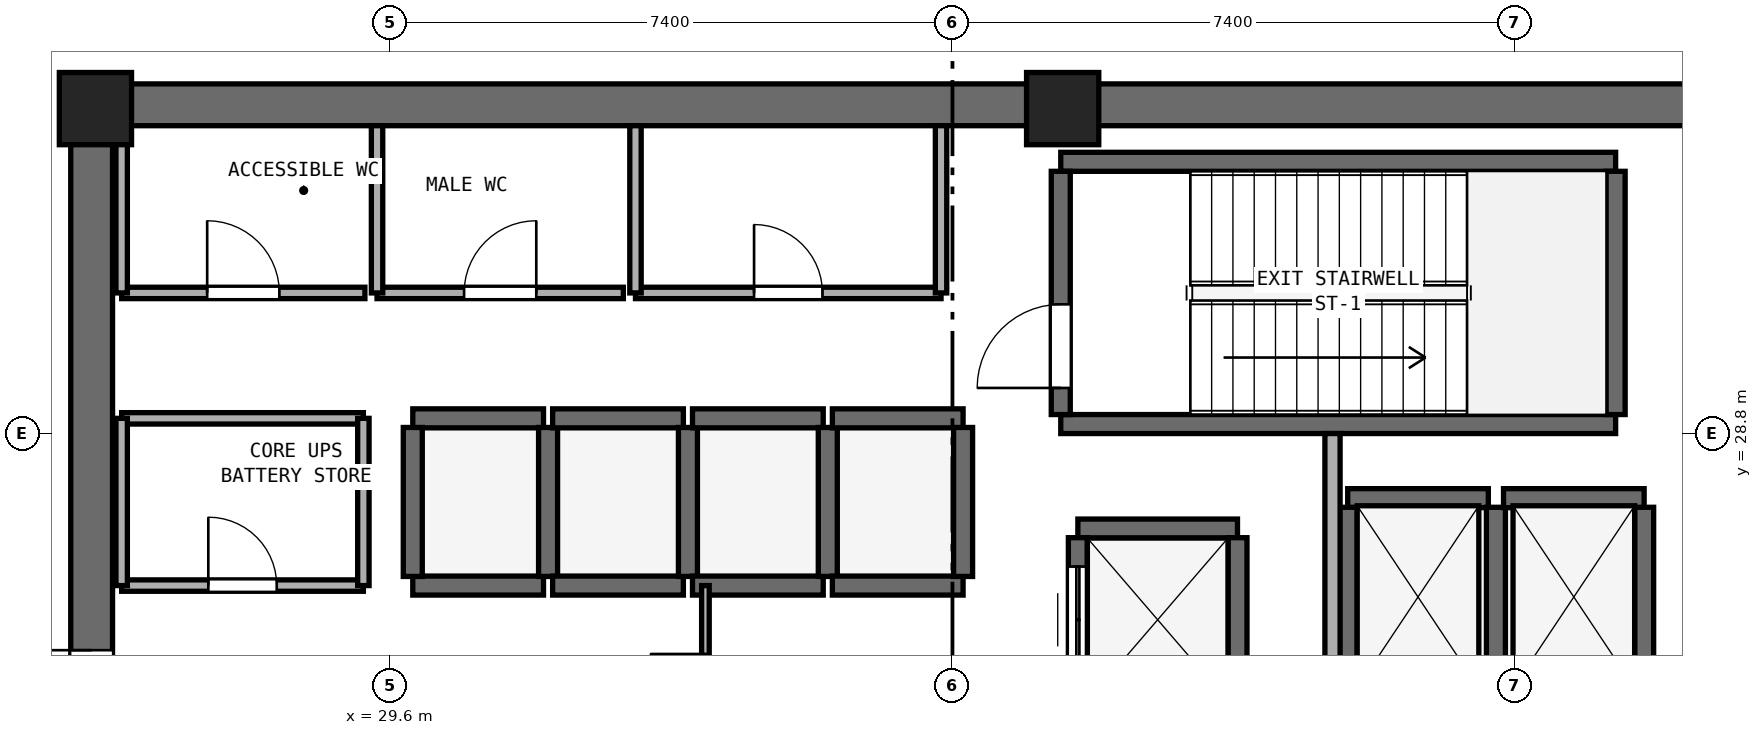
"""IFC4 building model, lengths in metres.
Left out: names, types, materials, properties, quantities, classifications, styles, units other than length and angle.
Written with IfcOpenShell. Run it as: python <this file> out.ifc"""

import sys

from ifc_helpers import new_model, si_unit, direction, frame, frame_2d, origin, origin_2d, place, context, subcontext, project, spatial, rectangle, extrude, element, fill, save


model = new_model("IFC4")
c1 = context("Model", 3, precision=1e-05, world=origin(), true_north=direction((0.0, 1.0)))
c2 = subcontext(c1, "Body", "Model", "MODEL_VIEW")
j1 = project(units=[si_unit("LENGTHUNIT", "METRE"), si_unit("PLANEANGLEUNIT", "RADIAN")], contexts=[c1])
p1 = place(None, origin())
s1 = spatial("IfcSite", under=j1, at=p1, CompositionType="ELEMENT")
p2 = place(p1, origin())
s2 = spatial("IfcBuilding", under=s1, at=p2, CompositionType="ELEMENT")
p3 = place(p2, frame((0.0, 0.0, 220.0)))
s3 = spatial("IfcBuildingStorey", under=s2, at=p3, CompositionType="ELEMENT", Elevation=220.0)
p4 = place(p3, frame((25.4, 33.125, 0.0), z_axis=(0.0, 0.0, 1.0), x_axis=(1.0, 0.0, 0.0)))
e1 = element("IfcWall", 1, at=p4, inside=s3, PredefinedType="SHEAR", context=c2, shape_type="SweptSolid", body=[
    extrude(rectangle(XDim=23.2, YDim=0.55, at=frame_2d((11.6, 0.0))), origin(), (0.0, 0.0, 1.0), 4.71),
])
p5 = place(p3, frame((25.675, 17.55, 0.0), z_axis=(0.0, 0.0, 1.0), x_axis=(0.0, 1.0, 0.0)))
e2 = element("IfcWall", 2, at=p5, inside=s3, PredefinedType="SHEAR", context=c2, shape_type="SweptSolid", body=[
    extrude(rectangle(XDim=15.3, YDim=0.55, at=frame_2d((7.65, 0.0))), origin(), (0.0, 0.0, 1.0), 4.71),
])
p6 = place(p5, frame((6.9, 0.0, 0.0)))
e3 = element("IfcOpeningElement", 3, at=p6, cuts=e2, PredefinedType="OPENING", context=c2, shape_type="SweptSolid", body=[
    extrude(rectangle(XDim=1.5, YDim=2.15, at=frame_2d((0.75, 1.075))), frame((0.0, 0.285, 0.0), z_axis=(0.0, -1.0, 0.0), x_axis=(1.0, 0.0, 0.0)), (0.0, 0.0, 1.0), 0.57),
])
for number, where, z_axis, x_axis in (
    (4, (38.45, 33.075, 0.0), (0.0, 0.0, 1.0), (1.0, 0.0, 0.0)),
    (5, (25.725, 33.075, 0.0), (0.0, 0.0, 1.0), (1.0, 0.0, 0.0)),
):
    element("IfcColumn", number, at=place(p3, frame(where, z_axis=z_axis, x_axis=x_axis)), inside=s3, PredefinedType="PILASTER", context=c2, shape_type="SweptSolid", body=[
        extrude(rectangle(XDim=0.95, YDim=0.95, at=origin_2d()), origin(), (0.0, 0.0, 1.0), 5.0),
    ])
for number, where, z_axis, x_axis in (
    (6, (38.425, 28.925, 0.0), (0.0, 0.0, 1.0), (1.0, 0.0, 0.0)),
    (7, (38.425, 32.375, 0.0), (0.0, 0.0, 1.0), (1.0, 0.0, 0.0)),
):
    element("IfcWall", number, at=place(p3, frame(where, z_axis=z_axis, x_axis=x_axis)), inside=s3, PredefinedType="SHEAR", context=c2, shape_type="SweptSolid", body=[
        extrude(rectangle(XDim=7.3, YDim=0.25, at=frame_2d((3.65, 0.0))), origin(), (0.0, 0.0, 1.0), 4.71),
    ])
p7 = place(p3, frame((38.425, 29.05, 0.0), z_axis=(0.0, 0.0, 1.0), x_axis=(0.0, 1.0, 0.0)))
e8 = element("IfcWall", 8, at=p7, inside=s3, PredefinedType="SHEAR", context=c2, shape_type="SweptSolid", body=[
    extrude(rectangle(XDim=3.2, YDim=0.25, at=frame_2d((1.6, 0.0))), origin(), (0.0, 0.0, 1.0), 4.71),
])
p8 = place(p7, frame((0.35, 0.0, 0.0)))
e9 = element("IfcOpeningElement", 9, at=p8, cuts=e8, PredefinedType="OPENING", context=c2, shape_type="SweptSolid", body=[
    extrude(rectangle(XDim=1.1, YDim=2.15, at=frame_2d((0.55, 1.075))), frame((0.0, 0.135, 0.0), z_axis=(0.0, -1.0, 0.0), x_axis=(1.0, 0.0, 0.0)), (0.0, 0.0, 1.0), 0.27),
])
p9 = place(p3, frame((45.725, 29.05, 0.0), z_axis=(0.0, 0.0, 1.0), x_axis=(0.0, 1.0, 0.0)))
e10 = element("IfcWall", 10, at=p9, inside=s3, PredefinedType="SHEAR", context=c2, shape_type="SweptSolid", body=[
    extrude(rectangle(XDim=3.2, YDim=0.25, at=frame_2d((1.6, 0.0))), origin(), (0.0, 0.0, 1.0), 4.71),
])
for number, where, z_axis, x_axis in (
    (11, (29.9, 26.8, 0.0), (0.0, 0.0, 1.0), (1.0, 0.0, 0.0)),
    (12, (29.9, 29.0, 0.0), (0.0, 0.0, 1.0), (1.0, 0.0, 0.0)),
):
    element("IfcWall", number, at=place(p3, frame(where, z_axis=z_axis, x_axis=x_axis)), inside=s3, PredefinedType="SHEAR", context=c2, shape_type="SweptSolid", body=[
        extrude(rectangle(XDim=1.72, YDim=0.25, at=frame_2d((0.86, 0.0))), origin(), (0.0, 0.0, 1.0), 4.71),
    ])
for number, where, z_axis, x_axis in (
    (13, (29.9, 26.92, 0.0), (0.0, 0.0, 1.0), (0.0, 1.0, 0.0)),
    (14, (31.68, 26.92, 0.0), (0.0, 0.0, 1.0), (0.0, 1.0, 0.0)),
):
    element("IfcWall", number, at=place(p3, frame(where, z_axis=z_axis, x_axis=x_axis)), inside=s3, PredefinedType="SHEAR", context=c2, shape_type="SweptSolid", body=[
        extrude(rectangle(XDim=1.96, YDim=0.25, at=frame_2d((0.98, 0.0))), origin(), (0.0, 0.0, 1.0), 4.71),
    ])
for number, where, z_axis, x_axis in (
    (15, (31.74, 26.8, 0.0), (0.0, 0.0, 1.0), (1.0, 0.0, 0.0)),
    (16, (31.74, 29.0, 0.0), (0.0, 0.0, 1.0), (1.0, 0.0, 0.0)),
):
    element("IfcWall", number, at=place(p3, frame(where, z_axis=z_axis, x_axis=x_axis)), inside=s3, PredefinedType="SHEAR", context=c2, shape_type="SweptSolid", body=[
        extrude(rectangle(XDim=1.72, YDim=0.25, at=frame_2d((0.86, 0.0))), origin(), (0.0, 0.0, 1.0), 4.71),
    ])
p10 = place(p3, frame((33.52, 26.92, 0.0), z_axis=(0.0, 0.0, 1.0), x_axis=(0.0, 1.0, 0.0)))
e17 = element("IfcWall", 17, at=p10, inside=s3, PredefinedType="SHEAR", context=c2, shape_type="SweptSolid", body=[
    extrude(rectangle(XDim=1.96, YDim=0.25, at=frame_2d((0.98, 0.0))), origin(), (0.0, 0.0, 1.0), 4.71),
])
for number, where, z_axis, x_axis in (
    (18, (33.58, 26.8, 0.0), (0.0, 0.0, 1.0), (1.0, 0.0, 0.0)),
    (19, (33.58, 29.0, 0.0), (0.0, 0.0, 1.0), (1.0, 0.0, 0.0)),
):
    element("IfcWall", number, at=place(p3, frame(where, z_axis=z_axis, x_axis=x_axis)), inside=s3, PredefinedType="SHEAR", context=c2, shape_type="SweptSolid", body=[
        extrude(rectangle(XDim=1.72, YDim=0.25, at=frame_2d((0.86, 0.0))), origin(), (0.0, 0.0, 1.0), 4.71),
    ])
p11 = place(p3, frame((35.36, 26.92, 0.0), z_axis=(0.0, 0.0, 1.0), x_axis=(0.0, 1.0, 0.0)))
e20 = element("IfcWall", 20, at=p11, inside=s3, PredefinedType="SHEAR", context=c2, shape_type="SweptSolid", body=[
    extrude(rectangle(XDim=1.96, YDim=0.25, at=frame_2d((0.98, 0.0))), origin(), (0.0, 0.0, 1.0), 4.71),
])
for number, where, z_axis, x_axis in (
    (21, (35.42, 26.8, 0.0), (0.0, 0.0, 1.0), (1.0, 0.0, 0.0)),
    (22, (35.42, 29.0, 0.0), (0.0, 0.0, 1.0), (1.0, 0.0, 0.0)),
):
    element("IfcWall", number, at=place(p3, frame(where, z_axis=z_axis, x_axis=x_axis)), inside=s3, PredefinedType="SHEAR", context=c2, shape_type="SweptSolid", body=[
        extrude(rectangle(XDim=1.72, YDim=0.25, at=frame_2d((0.86, 0.0))), origin(), (0.0, 0.0, 1.0), 4.71),
    ])
p12 = place(p3, frame((37.14, 26.92, 0.0), z_axis=(0.0, 0.0, 1.0), x_axis=(0.0, 1.0, 0.0)))
e23 = element("IfcWall", 23, at=p12, inside=s3, PredefinedType="SHEAR", context=c2, shape_type="SweptSolid", body=[
    extrude(rectangle(XDim=1.96, YDim=0.25, at=frame_2d((0.98, 0.0))), origin(), (0.0, 0.0, 1.0), 4.71),
])
p13 = place(p3, frame((42.2, 27.95, 0.0), z_axis=(0.0, 0.0, 1.0), x_axis=(1.0, 0.0, 0.0)))
e24 = element("IfcWall", 24, at=p13, inside=s3, PredefinedType="SHEAR", context=c2, shape_type="SweptSolid", body=[
    extrude(rectangle(XDim=1.85, YDim=0.25, at=frame_2d((0.925, 0.0))), origin(), (0.0, 0.0, 1.0), 4.71),
])
for number, where, z_axis, x_axis in (
    (25, (42.2, 25.47, 0.0), (0.0, 0.0, 1.0), (0.0, 1.0, 0.0)),
    (26, (44.15, 25.47, 0.0), (0.0, 0.0, 1.0), (0.0, 1.0, 0.0)),
):
    element("IfcWall", number, at=place(p3, frame(where, z_axis=z_axis, x_axis=x_axis)), inside=s3, PredefinedType="SHEAR", context=c2, shape_type="SweptSolid", body=[
        extrude(rectangle(XDim=2.36, YDim=0.25, at=frame_2d((1.18, 0.0))), origin(), (0.0, 0.0, 1.0), 4.71),
    ])
p14 = place(p3, frame((44.25, 27.95, 0.0), z_axis=(0.0, 0.0, 1.0), x_axis=(1.0, 0.0, 0.0)))
e27 = element("IfcWall", 27, at=p14, inside=s3, PredefinedType="SHEAR", context=c2, shape_type="SweptSolid", body=[
    extrude(rectangle(XDim=1.85, YDim=0.25, at=frame_2d((0.925, 0.0))), origin(), (0.0, 0.0, 1.0), 4.71),
])
p15 = place(p3, frame((46.1, 25.47, 0.0), z_axis=(0.0, 0.0, 1.0), x_axis=(0.0, 1.0, 0.0)))
e28 = element("IfcWall", 28, at=p15, inside=s3, PredefinedType="SHEAR", context=c2, shape_type="SweptSolid", body=[
    extrude(rectangle(XDim=2.36, YDim=0.25, at=frame_2d((1.18, 0.0))), origin(), (0.0, 0.0, 1.0), 4.71),
])
p16 = place(p3, frame((38.65, 27.55, 0.0), z_axis=(0.0, 0.0, 1.0), x_axis=(1.0, 0.0, 0.0)))
e29 = element("IfcWall", 29, at=p16, inside=s3, PredefinedType="SHEAR", context=c2, shape_type="SweptSolid", body=[
    extrude(rectangle(XDim=2.1, YDim=0.25, at=frame_2d((1.05, 0.0))), origin(), (0.0, 0.0, 1.0), 4.71),
])
p17 = place(p3, frame((38.65, 25.27, 0.0), z_axis=(0.0, 0.0, 1.0), x_axis=(0.0, 1.0, 0.0)))
e30 = element("IfcWall", 30, at=p17, inside=s3, PredefinedType="SHEAR", context=c2, shape_type="SweptSolid", body=[
    extrude(rectangle(XDim=2.16, YDim=0.25, at=frame_2d((1.08, 0.0))), origin(), (0.0, 0.0, 1.0), 4.71),
])
p18 = place(p17, frame((0.38, 0.0, 0.0)))
e31 = element("IfcOpeningElement", 31, at=p18, cuts=e30, PredefinedType="OPENING", context=c2, shape_type="SweptSolid", body=[
    extrude(rectangle(XDim=1.4, YDim=2.2, at=frame_2d((0.7, 1.1))), frame((0.0, 0.135, 0.0), z_axis=(0.0, -1.0, 0.0), x_axis=(1.0, 0.0, 0.0)), (0.0, 0.0, 1.0), 0.27),
])
p19 = place(p3, frame((40.75, 25.27, 0.0), z_axis=(0.0, 0.0, 1.0), x_axis=(0.0, 1.0, 0.0)))
e32 = element("IfcWall", 32, at=p19, inside=s3, PredefinedType="SHEAR", context=c2, shape_type="SweptSolid", body=[
    extrude(rectangle(XDim=2.16, YDim=0.25, at=frame_2d((1.08, 0.0))), origin(), (0.0, 0.0, 1.0), 4.71),
])
p20 = place(p3, frame((42.0, 22.75, 0.0), z_axis=(0.0, 0.0, 1.0), x_axis=(0.0, 1.0, 0.0)))
e33 = element("IfcWall", 33, at=p20, inside=s3, PredefinedType="SOLIDWALL", context=c2, shape_type="SweptSolid", body=[
    extrude(rectangle(XDim=6.05, YDim=0.2, at=frame_2d((3.025, 0.0))), origin(), (0.0, 0.0, 1.0), 4.71),
])
p21 = place(p20, frame((0.65, 0.0, 0.0)))
e34 = element("IfcOpeningElement", 34, at=p21, cuts=e33, PredefinedType="OPENING", context=c2, shape_type="SweptSolid", body=[
    extrude(rectangle(XDim=1.2, YDim=2.15, at=frame_2d((0.6, 1.075))), frame((0.0, 0.11, 0.0), z_axis=(0.0, -1.0, 0.0), x_axis=(1.0, 0.0, 0.0)), (0.0, 0.0, 1.0), 0.22),
])
p22 = place(p3, frame((26.07, 30.65, 0.0), z_axis=(0.0, 0.0, 1.0), x_axis=(1.0, 0.0, 0.0)))
e35 = element("IfcWall", 35, at=p22, inside=s3, PredefinedType="PARTITIONING", context=c2, shape_type="SweptSolid", body=[
    extrude(rectangle(XDim=3.2, YDim=0.15, at=frame_2d((1.6, 0.0))), origin(), (0.0, 0.0, 1.0), 4.71),
])
p23 = place(p22, frame((1.125, 0.0, 0.0)))
e36 = element("IfcOpeningElement", 36, at=p23, cuts=e35, PredefinedType="OPENING", context=c2, shape_type="SweptSolid", body=[
    extrude(rectangle(XDim=0.95, YDim=2.1, at=frame_2d((0.475, 1.05))), frame((0.0, 0.085, 0.0), z_axis=(0.0, -1.0, 0.0), x_axis=(1.0, 0.0, 0.0)), (0.0, 0.0, 1.0), 0.17),
])
p24 = place(p3, frame((26.07, 30.65, 0.0), z_axis=(0.0, 0.0, 1.0), x_axis=(0.0, 1.0, 0.0)))
e37 = element("IfcWall", 37, at=p24, inside=s3, PredefinedType="PARTITIONING", context=c2, shape_type="SweptSolid", body=[
    extrude(rectangle(XDim=2.2, YDim=0.15, at=frame_2d((1.1, 0.0))), origin(), (0.0, 0.0, 1.0), 3.81),
])
p25 = place(p3, frame((29.43, 30.65, 0.0), z_axis=(0.0, 0.0, 1.0), x_axis=(1.0, 0.0, 0.0)))
e38 = element("IfcWall", 38, at=p25, inside=s3, PredefinedType="PARTITIONING", context=c2, shape_type="SweptSolid", body=[
    extrude(rectangle(XDim=3.24, YDim=0.15, at=frame_2d((1.62, 0.0))), origin(), (0.0, 0.0, 1.0), 4.71),
])
p26 = place(p25, frame((1.145, 0.0, 0.0)))
e39 = element("IfcOpeningElement", 39, at=p26, cuts=e38, PredefinedType="OPENING", context=c2, shape_type="SweptSolid", body=[
    extrude(rectangle(XDim=0.95, YDim=2.1, at=frame_2d((0.475, 1.05))), frame((0.0, 0.085, 0.0), z_axis=(0.0, -1.0, 0.0), x_axis=(1.0, 0.0, 0.0)), (0.0, 0.0, 1.0), 0.17),
])
p27 = place(p3, frame((29.43, 30.65, 0.0), z_axis=(0.0, 0.0, 1.0), x_axis=(0.0, 1.0, 0.0)))
e40 = element("IfcWall", 40, at=p27, inside=s3, PredefinedType="PARTITIONING", context=c2, shape_type="SweptSolid", body=[
    extrude(rectangle(XDim=2.2, YDim=0.15, at=frame_2d((1.1, 0.0))), origin(), (0.0, 0.0, 1.0), 4.71),
])
p28 = place(p3, frame((32.83, 30.65, 0.0), z_axis=(0.0, 0.0, 1.0), x_axis=(1.0, 0.0, 0.0)))
e41 = element("IfcWall", 41, at=p28, inside=s3, PredefinedType="PARTITIONING", context=c2, shape_type="SweptSolid", body=[
    extrude(rectangle(XDim=4.02, YDim=0.15, at=frame_2d((2.01, 0.0))), origin(), (0.0, 0.0, 1.0), 4.71),
])
p29 = place(p28, frame((1.56, 0.0, 0.0)))
e42 = element("IfcOpeningElement", 42, at=p29, cuts=e41, PredefinedType="OPENING", context=c2, shape_type="SweptSolid", body=[
    extrude(rectangle(XDim=0.9, YDim=2.1, at=frame_2d((0.45, 1.05))), frame((0.0, 0.085, 0.0), z_axis=(0.0, -1.0, 0.0), x_axis=(1.0, 0.0, 0.0)), (0.0, 0.0, 1.0), 0.17),
])
for number, where, z_axis, x_axis in (
    (43, (32.83, 30.65, 0.0), (0.0, 0.0, 1.0), (0.0, 1.0, 0.0)),
    (44, (36.85, 30.65, 0.0), (0.0, 0.0, 1.0), (0.0, 1.0, 0.0)),
):
    element("IfcWall", number, at=place(p3, frame(where, z_axis=z_axis, x_axis=x_axis)), inside=s3, PredefinedType="PARTITIONING", context=c2, shape_type="SweptSolid", body=[
        extrude(rectangle(XDim=2.2, YDim=0.15, at=frame_2d((1.1, 0.0))), origin(), (0.0, 0.0, 1.0), 4.71),
    ])
p30 = place(p3, frame((26.07, 26.8, 0.0), z_axis=(0.0, 0.0, 1.0), x_axis=(1.0, 0.0, 0.0)))
e45 = element("IfcWall", 45, at=p30, inside=s3, PredefinedType="PARTITIONING", context=c2, shape_type="SweptSolid", body=[
    extrude(rectangle(XDim=3.18, YDim=0.15, at=frame_2d((1.59, 0.0))), origin(), (0.0, 0.0, 1.0), 4.71),
])
p31 = place(p30, frame((1.14, 0.0, 0.0)))
e46 = element("IfcOpeningElement", 46, at=p31, cuts=e45, PredefinedType="OPENING", context=c2, shape_type="SweptSolid", body=[
    extrude(rectangle(XDim=0.9, YDim=2.1, at=frame_2d((0.45, 1.05))), frame((0.0, 0.085, 0.0), z_axis=(0.0, -1.0, 0.0), x_axis=(1.0, 0.0, 0.0)), (0.0, 0.0, 1.0), 0.17),
])
p32 = place(p3, frame((26.07, 29.0, 0.0), z_axis=(0.0, 0.0, 1.0), x_axis=(1.0, 0.0, 0.0)))
e47 = element("IfcWall", 47, at=p32, inside=s3, PredefinedType="PARTITIONING", context=c2, shape_type="SweptSolid", body=[
    extrude(rectangle(XDim=3.18, YDim=0.15, at=frame_2d((1.59, 0.0))), origin(), (0.0, 0.0, 1.0), 4.71),
])
p33 = place(p3, frame((26.07, 26.8, 0.0), z_axis=(0.0, 0.0, 1.0), x_axis=(0.0, 1.0, 0.0)))
e48 = element("IfcWall", 48, at=p33, inside=s3, PredefinedType="PARTITIONING", context=c2, shape_type="SweptSolid", body=[
    extrude(rectangle(XDim=2.2, YDim=0.15, at=frame_2d((1.1, 0.0))), origin(), (0.0, 0.0, 1.0), 3.81),
])
p34 = place(p3, frame((29.25, 26.8, 0.0), z_axis=(0.0, 0.0, 1.0), x_axis=(0.0, 1.0, 0.0)))
e49 = element("IfcWall", 49, at=p34, inside=s3, PredefinedType="PARTITIONING", context=c2, shape_type="SweptSolid", body=[
    extrude(rectangle(XDim=2.2, YDim=0.15, at=frame_2d((1.1, 0.0))), origin(), (0.0, 0.0, 1.0), 4.71),
])
p35 = place(p3, frame((33.75, 23.6, 0.0), z_axis=(0.0, 0.0, 1.0), x_axis=(0.0, 1.0, 0.0)))
e50 = element("IfcWall", 50, at=p35, inside=s3, PredefinedType="PARTITIONING", context=c2, shape_type="SweptSolid", body=[
    extrude(rectangle(XDim=3.2, YDim=0.1, at=frame_2d((1.6, 0.0))), origin(), (0.0, 0.0, 1.0), 4.71),
])
p36 = place(p35, frame((0.85, 0.0, 0.0)))
e51 = element("IfcOpeningElement", 51, at=p36, cuts=e50, PredefinedType="OPENING", context=c2, shape_type="SweptSolid", body=[
    extrude(rectangle(XDim=1.45, YDim=2.12, at=frame_2d((0.725, 1.06))), frame((0.0, 0.06, 0.0), z_axis=(0.0, -1.0, 0.0), x_axis=(1.0, 0.0, 0.0)), (0.0, 0.0, 1.0), 0.12),
])
p37 = place(p8, origin())
e52 = element("IfcDoor", 52, at=p37, inside=s3, OperationType="SINGLE_SWING_LEFT", PredefinedType="DOOR", context=c2, shape_type="SweptSolid", body=[
    extrude(rectangle(XDim=1.1, YDim=2.15, at=frame_2d((0.55, 1.075))), frame((0.0, 0.025, 0.0), z_axis=(0.0, -1.0, 0.0), x_axis=(1.0, 0.0, 0.0)), (0.0, 0.0, 1.0), 0.05),
])
fill(e9, e52)
p38 = place(p18, origin())
e53 = element("IfcDoor", 53, at=p38, inside=s3, OperationType="DOUBLE_DOOR_SLIDING", PredefinedType="DOOR", context=c2, shape_type="SweptSolid", body=[
    extrude(rectangle(XDim=1.4, YDim=2.2, at=frame_2d((0.7, 1.1))), frame((0.0, 0.025, 0.0), z_axis=(0.0, -1.0, 0.0), x_axis=(1.0, 0.0, 0.0)), (0.0, 0.0, 1.0), 0.05),
])
fill(e31, e53)
p39 = place(p6, origin())
e54 = element("IfcDoor", 54, at=p39, inside=s3, OperationType="DOUBLE_DOOR_SINGLE_SWING", PredefinedType="DOOR", context=c2, shape_type="SweptSolid", body=[
    extrude(rectangle(XDim=1.5, YDim=2.15, at=frame_2d((0.75, 1.075))), frame((0.0, 0.025, 0.0), z_axis=(0.0, -1.0, 0.0), x_axis=(1.0, 0.0, 0.0)), (0.0, 0.0, 1.0), 0.05),
])
fill(e3, e54)
p40 = place(p23, origin())
e55 = element("IfcDoor", 55, at=p40, inside=s3, OperationType="SINGLE_SWING_LEFT", PredefinedType="DOOR", context=c2, shape_type="SweptSolid", body=[
    extrude(rectangle(XDim=0.95, YDim=2.1, at=frame_2d((0.475, 1.05))), frame((0.0, 0.025, 0.0), z_axis=(0.0, -1.0, 0.0), x_axis=(1.0, 0.0, 0.0)), (0.0, 0.0, 1.0), 0.05),
])
fill(e36, e55)
p41 = place(p26, origin())
e56 = element("IfcDoor", 56, at=p41, inside=s3, OperationType="SINGLE_SWING_RIGHT", PredefinedType="DOOR", context=c2, shape_type="SweptSolid", body=[
    extrude(rectangle(XDim=0.95, YDim=2.1, at=frame_2d((0.475, 1.05))), frame((0.0, 0.025, 0.0), z_axis=(0.0, -1.0, 0.0), x_axis=(1.0, 0.0, 0.0)), (0.0, 0.0, 1.0), 0.05),
])
fill(e39, e56)
p42 = place(p29, origin())
e57 = element("IfcDoor", 57, at=p42, inside=s3, OperationType="SINGLE_SWING_LEFT", PredefinedType="DOOR", context=c2, shape_type="SweptSolid", body=[
    extrude(rectangle(XDim=0.9, YDim=2.1, at=frame_2d((0.45, 1.05))), frame((0.0, 0.025, 0.0), z_axis=(0.0, -1.0, 0.0), x_axis=(1.0, 0.0, 0.0)), (0.0, 0.0, 1.0), 0.05),
])
fill(e42, e57)
p43 = place(p31, origin())
e58 = element("IfcDoor", 58, at=p43, inside=s3, OperationType="SINGLE_SWING_LEFT", PredefinedType="DOOR", context=c2, shape_type="SweptSolid", body=[
    extrude(rectangle(XDim=0.9, YDim=2.1, at=frame_2d((0.45, 1.05))), frame((0.0, 0.025, 0.0), z_axis=(0.0, -1.0, 0.0), x_axis=(1.0, 0.0, 0.0)), (0.0, 0.0, 1.0), 0.05),
])
fill(e46, e58)
p44 = place(p36, origin())
e59 = element("IfcDoor", 59, at=p44, inside=s3, OperationType="DOUBLE_DOOR_SINGLE_SWING", PredefinedType="DOOR", context=c2, shape_type="SweptSolid", body=[
    extrude(rectangle(XDim=1.45, YDim=2.12, at=frame_2d((0.725, 1.06))), frame((0.0, 0.025, 0.0), z_axis=(0.0, -1.0, 0.0), x_axis=(1.0, 0.0, 0.0)), (0.0, 0.0, 1.0), 0.05),
])
fill(e51, e59)
save(model, sys.argv[1])
